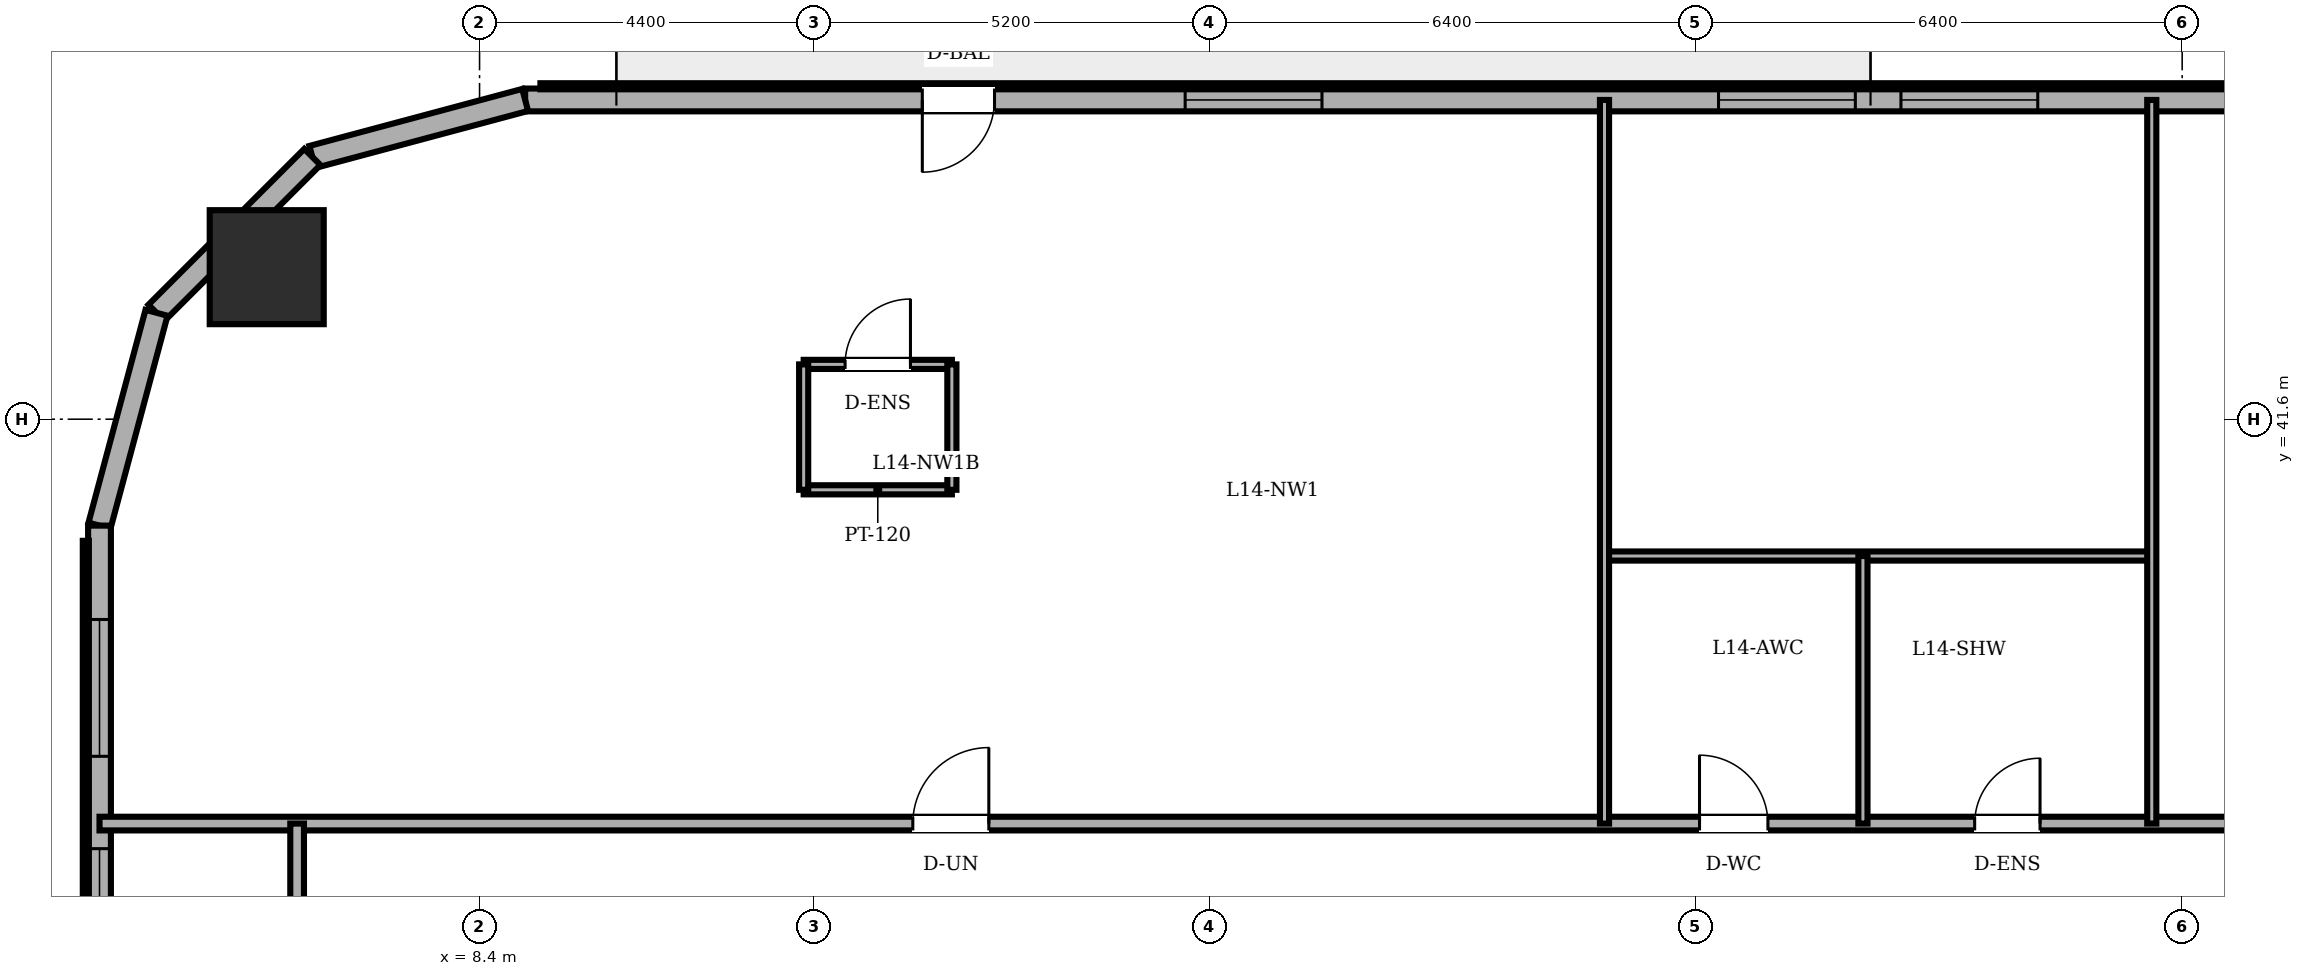
"""IFC4 building model, lengths in metres.
Left out: names, types, materials, properties, quantities, classifications, styles, units other than length and angle.
Written with IfcOpenShell. Run it as: python <this file> out.ifc"""

import sys

from ifc_helpers import new_model, si_unit, direction, frame, frame_2d, origin, origin_2d, place, context, subcontext, project, spatial, rectangle, circle, extrude, element, fill, save


model = new_model("IFC4")
c1 = context("Model", 3, precision=1e-05, world=origin(), true_north=direction((0.0, 1.0)))
c2 = subcontext(c1, "Body", "Model", "MODEL_VIEW")
j1 = project(units=[si_unit("LENGTHUNIT", "METRE"), si_unit("PLANEANGLEUNIT", "RADIAN")], contexts=[c1])
p1 = place(None, origin())
s1 = spatial("IfcSite", under=j1, at=p1, CompositionType="ELEMENT")
p2 = place(p1, origin())
s2 = spatial("IfcBuilding", under=s1, at=p2, CompositionType="ELEMENT")
p3 = place(p2, frame((0.0, 0.0, 54.0)))
s3 = spatial("IfcBuildingStorey", under=s2, at=p3, CompositionType="ELEMENT", Elevation=54.0)
p4 = place(p3, frame((5.6, 43.6, 0.0), z_axis=(0.0, 0.0, 1.0), x_axis=(1.0, 0.0, 0.0)))
e1 = element("IfcColumn", 1, at=p4, inside=s3, PredefinedType="COLUMN", context=c2, shape_type="SweptSolid", body=[
    extrude(circle(Radius=0.75, at=origin_2d()), origin(), (0.0, 0.0, 1.0), 3.6),
])
p5 = place(p3, frame((39.079, 45.8, 0.0), z_axis=(0.0, 0.0, 1.0), x_axis=(-1.0, 0.0, 0.0)))
e2 = element("IfcWall", 2, at=p5, inside=s3, PredefinedType="SOLIDWALL", context=c2, shape_type="SweptSolid", body=[
    extrude(rectangle(XDim=30.079, YDim=0.3, at=frame_2d((15.04, 0.0))), origin(), (0.0, 0.0, 1.0), 3.4),
])
p6 = place(p5, frame((23.904, 0.0, 0.0)))
e3 = element("IfcOpeningElement", 3, at=p6, cuts=e2, PredefinedType="OPENING", context=c2, shape_type="SweptSolid", body=[
    extrude(rectangle(XDim=0.95, YDim=2.2, at=frame_2d((0.475, 1.1))), frame((0.0, 0.16, 0.0), z_axis=(0.0, -1.0, 0.0), x_axis=(1.0, 0.0, 0.0)), (0.0, 0.0, 1.0), 0.32),
])
p7 = place(p5, frame((2.226, 0.0, 0.85)))
e4 = element("IfcOpeningElement", 4, at=p7, cuts=e2, PredefinedType="OPENING", context=c2, shape_type="SweptSolid", body=[
    extrude(rectangle(XDim=1.8, YDim=1.55, at=frame_2d((0.9, 0.775))), frame((0.0, 0.16, 0.0), z_axis=(0.0, -1.0, 0.0), x_axis=(1.0, 0.0, 0.0)), (0.0, 0.0, 1.0), 0.32),
])
p8 = place(p5, frame((5.003, 0.0, 0.85)))
e5 = element("IfcOpeningElement", 5, at=p8, cuts=e2, PredefinedType="OPENING", context=c2, shape_type="SweptSolid", body=[
    extrude(rectangle(XDim=1.8, YDim=1.55, at=frame_2d((0.9, 0.775))), frame((0.0, 0.16, 0.0), z_axis=(0.0, -1.0, 0.0), x_axis=(1.0, 0.0, 0.0)), (0.0, 0.0, 1.0), 0.32),
])
p9 = place(p5, frame((10.179, 0.0, 0.85)))
e6 = element("IfcOpeningElement", 6, at=p9, cuts=e2, PredefinedType="OPENING", context=c2, shape_type="SweptSolid", body=[
    extrude(rectangle(XDim=1.8, YDim=1.55, at=frame_2d((0.9, 0.775))), frame((0.0, 0.16, 0.0), z_axis=(0.0, -1.0, 0.0), x_axis=(1.0, 0.0, 0.0)), (0.0, 0.0, 1.0), 0.32),
])
p10 = place(p5, frame((12.579, 0.0, 0.85)))
e7 = element("IfcOpeningElement", 7, at=p10, cuts=e2, PredefinedType="OPENING", context=c2, shape_type="SweptSolid", body=[
    extrude(rectangle(XDim=1.8, YDim=1.55, at=frame_2d((0.9, 0.775))), frame((0.0, 0.16, 0.0), z_axis=(0.0, -1.0, 0.0), x_axis=(1.0, 0.0, 0.0)), (0.0, 0.0, 1.0), 0.32),
])
p11 = place(p5, frame((19.596, 0.0, 0.85)))
e8 = element("IfcOpeningElement", 8, at=p11, cuts=e2, PredefinedType="OPENING", context=c2, shape_type="SweptSolid", body=[
    extrude(rectangle(XDim=1.8, YDim=1.55, at=frame_2d((0.9, 0.775))), frame((0.0, 0.16, 0.0), z_axis=(0.0, -1.0, 0.0), x_axis=(1.0, 0.0, 0.0)), (0.0, 0.0, 1.0), 0.32),
])
p12 = place(p3, frame((9.0, 45.8, 0.0), z_axis=(0.0, 0.0, 1.0), x_axis=(-0.96594917914, -0.258731875344, 0.0)))
e9 = element("IfcWall", 9, at=p12, inside=s3, PredefinedType="SOLIDWALL", context=c2, shape_type="SweptSolid", body=[
    extrude(rectangle(XDim=2.899, YDim=0.3, at=frame_2d((1.449, 0.0))), origin(), (0.0, 0.0, 1.0), 3.4),
])
p13 = place(p3, frame((6.2, 45.05, 0.0), z_axis=(0.0, 0.0, 1.0), x_axis=(-0.707106781187, -0.707106781187, 0.0)))
e10 = element("IfcWall", 10, at=p13, inside=s3, PredefinedType="SOLIDWALL", context=c2, shape_type="SweptSolid", body=[
    extrude(rectangle(XDim=2.899, YDim=0.3, at=frame_2d((1.45, 0.0))), origin(), (0.0, 0.0, 1.0), 3.4),
])
p14 = place(p3, frame((4.15, 43.0, 0.0), z_axis=(0.0, 0.0, 1.0), x_axis=(-0.258731875344, -0.96594917914, 0.0)))
e11 = element("IfcWall", 11, at=p14, inside=s3, PredefinedType="SOLIDWALL", context=c2, shape_type="SweptSolid", body=[
    extrude(rectangle(XDim=2.899, YDim=0.3, at=frame_2d((1.449, 0.0))), origin(), (0.0, 0.0, 1.0), 3.4),
])
p15 = place(p3, frame((3.4, 40.2, 0.0), z_axis=(0.0, 0.0, 1.0), x_axis=(0.0, -1.0, 0.0)))
e12 = element("IfcWall", 12, at=p15, inside=s3, PredefinedType="SOLIDWALL", context=c2, shape_type="SweptSolid", body=[
    extrude(rectangle(XDim=32.4, YDim=0.3, at=frame_2d((16.2, 0.0))), origin(), (0.0, 0.0, 1.0), 3.4),
])
p16 = place(p15, frame((1.235, 0.0, 0.85)))
e13 = element("IfcOpeningElement", 13, at=p16, cuts=e12, PredefinedType="OPENING", context=c2, shape_type="SweptSolid", body=[
    extrude(rectangle(XDim=1.8, YDim=1.55, at=frame_2d((0.9, 0.775))), frame((0.0, 0.16, 0.0), z_axis=(0.0, -1.0, 0.0), x_axis=(1.0, 0.0, 0.0)), (0.0, 0.0, 1.0), 0.32),
])
p17 = place(p15, frame((4.25, 0.0, 0.85)))
e14 = element("IfcOpeningElement", 14, at=p17, cuts=e12, PredefinedType="OPENING", context=c2, shape_type="SweptSolid", body=[
    extrude(rectangle(XDim=1.8, YDim=1.55, at=frame_2d((0.9, 0.775))), frame((0.0, 0.16, 0.0), z_axis=(0.0, -1.0, 0.0), x_axis=(1.0, 0.0, 0.0)), (0.0, 0.0, 1.0), 0.32),
])
p18 = place(p15, frame((9.253, 0.0, 0.85)))
e15 = element("IfcOpeningElement", 15, at=p18, cuts=e12, PredefinedType="OPENING", context=c2, shape_type="SweptSolid", body=[
    extrude(rectangle(XDim=1.8, YDim=1.55, at=frame_2d((0.9, 0.775))), frame((0.0, 0.16, 0.0), z_axis=(0.0, -1.0, 0.0), x_axis=(1.0, 0.0, 0.0)), (0.0, 0.0, 1.0), 0.32),
])
p19 = place(p15, frame((13.027, 0.0, 0.85)))
e16 = element("IfcOpeningElement", 16, at=p19, cuts=e12, PredefinedType="OPENING", context=c2, shape_type="SweptSolid", body=[
    extrude(rectangle(XDim=1.8, YDim=1.55, at=frame_2d((0.9, 0.775))), frame((0.0, 0.16, 0.0), z_axis=(0.0, -1.0, 0.0), x_axis=(1.0, 0.0, 0.0)), (0.0, 0.0, 1.0), 0.32),
])
p20 = place(p15, frame((19.573, 0.0, 0.85)))
e17 = element("IfcOpeningElement", 17, at=p20, cuts=e12, PredefinedType="OPENING", context=c2, shape_type="SweptSolid", body=[
    extrude(rectangle(XDim=1.8, YDim=1.55, at=frame_2d((0.9, 0.775))), frame((0.0, 0.16, 0.0), z_axis=(0.0, -1.0, 0.0), x_axis=(1.0, 0.0, 0.0)), (0.0, 0.0, 1.0), 0.32),
])
p21 = place(p15, frame((22.347, 0.0, 0.85)))
e18 = element("IfcOpeningElement", 18, at=p21, cuts=e12, PredefinedType="OPENING", context=c2, shape_type="SweptSolid", body=[
    extrude(rectangle(XDim=1.8, YDim=1.55, at=frame_2d((0.9, 0.775))), frame((0.0, 0.16, 0.0), z_axis=(0.0, -1.0, 0.0), x_axis=(1.0, 0.0, 0.0)), (0.0, 0.0, 1.0), 0.32),
])
p22 = place(p15, frame((26.35, 0.0, 0.85)))
e19 = element("IfcOpeningElement", 19, at=p22, cuts=e12, PredefinedType="OPENING", context=c2, shape_type="SweptSolid", body=[
    extrude(rectangle(XDim=1.8, YDim=1.55, at=frame_2d((0.9, 0.775))), frame((0.0, 0.16, 0.0), z_axis=(0.0, -1.0, 0.0), x_axis=(1.0, 0.0, 0.0)), (0.0, 0.0, 1.0), 0.32),
])
p23 = place(p15, frame((29.365, 0.0, 0.85)))
e20 = element("IfcOpeningElement", 20, at=p23, cuts=e12, PredefinedType="OPENING", context=c2, shape_type="SweptSolid", body=[
    extrude(rectangle(XDim=1.8, YDim=1.55, at=frame_2d((0.9, 0.775))), frame((0.0, 0.16, 0.0), z_axis=(0.0, -1.0, 0.0), x_axis=(1.0, 0.0, 0.0)), (0.0, 0.0, 1.0), 0.32),
])
p24 = place(p3, frame((12.664, 42.321, 0.0), z_axis=(0.0, 0.0, 1.0), x_axis=(1.0, 0.0, 0.0)))
e21 = element("IfcWall", 21, at=p24, inside=s3, PredefinedType="PARTITIONING", context=c2, shape_type="SweptSolid", body=[
    extrude(rectangle(XDim=1.95, YDim=0.12, at=frame_2d((0.975, 0.0))), origin(), (0.0, 0.0, 1.0), 3.4),
])
p25 = place(p24, frame((0.545, 0.0, 0.0)))
e22 = element("IfcOpeningElement", 22, at=p25, cuts=e21, PredefinedType="OPENING", context=c2, shape_type="SweptSolid", body=[
    extrude(rectangle(XDim=0.86, YDim=2.1, at=frame_2d((0.43, 1.05))), frame((0.0, 0.07, 0.0), z_axis=(0.0, -1.0, 0.0), x_axis=(1.0, 0.0, 0.0)), (0.0, 0.0, 1.0), 0.14),
])
p26 = place(p3, frame((14.614, 40.671, 0.0), z_axis=(0.0, 0.0, 1.0), x_axis=(-1.0, 0.0, 0.0)))
e23 = element("IfcWall", 23, at=p26, inside=s3, PredefinedType="PARTITIONING", context=c2, shape_type="SweptSolid", body=[
    extrude(rectangle(XDim=1.95, YDim=0.12, at=frame_2d((0.975, 0.0))), origin(), (0.0, 0.0, 1.0), 3.4),
])
for number, where, z_axis, x_axis in (
    (24, (12.664, 42.321, 0.0), (0.0, 0.0, 1.0), (0.0, -1.0, 0.0)),
    (25, (14.614, 40.671, 0.0), (0.0, 0.0, 1.0), (0.0, 1.0, 0.0)),
):
    element("IfcWall", number, at=place(p3, frame(where, z_axis=z_axis, x_axis=x_axis)), inside=s3, PredefinedType="PARTITIONING", context=c2, shape_type="SweptSolid", body=[
        extrude(rectangle(XDim=1.65, YDim=0.12, at=frame_2d((0.825, 0.0))), origin(), (0.0, 0.0, 1.0), 3.4),
    ])
p27 = place(p3, frame((3.4, 36.28, 0.0), z_axis=(0.0, 0.0, 1.0), x_axis=(1.0, 0.0, 0.0)))
e26 = element("IfcWall", 26, at=p27, inside=s3, PredefinedType="PARTITIONING", context=c2, shape_type="SweptSolid", body=[
    extrude(rectangle(XDim=36.45, YDim=0.18, at=frame_2d((18.225, 0.0))), origin(), (0.0, 0.0, 1.0), 3.4),
])
p28 = place(p27, frame((21.05, 0.0, 0.0)))
e27 = element("IfcOpeningElement", 27, at=p28, cuts=e26, PredefinedType="OPENING", context=c2, shape_type="SweptSolid", body=[
    extrude(rectangle(XDim=0.9, YDim=2.1, at=frame_2d((0.45, 1.05))), frame((0.0, 0.1, 0.0), z_axis=(0.0, -1.0, 0.0), x_axis=(1.0, 0.0, 0.0)), (0.0, 0.0, 1.0), 0.2),
])
p29 = place(p27, frame((24.67, 0.0, 0.0)))
e28 = element("IfcOpeningElement", 28, at=p29, cuts=e26, PredefinedType="OPENING", context=c2, shape_type="SweptSolid", body=[
    extrude(rectangle(XDim=0.86, YDim=2.1, at=frame_2d((0.43, 1.05))), frame((0.0, 0.1, 0.0), z_axis=(0.0, -1.0, 0.0), x_axis=(1.0, 0.0, 0.0)), (0.0, 0.0, 1.0), 0.2),
])
p30 = place(p27, frame((10.7, 0.0, 0.0)))
e29 = element("IfcOpeningElement", 29, at=p30, cuts=e26, PredefinedType="OPENING", context=c2, shape_type="SweptSolid", body=[
    extrude(rectangle(XDim=1.0, YDim=2.15, at=frame_2d((0.5, 1.075))), frame((0.0, 0.1, 0.0), z_axis=(0.0, -1.0, 0.0), x_axis=(1.0, 0.0, 0.0)), (0.0, 0.0, 1.0), 0.2),
])
p31 = place(p27, frame((30.965, 0.0, 0.0)))
e30 = element("IfcOpeningElement", 30, at=p31, cuts=e26, PredefinedType="OPENING", context=c2, shape_type="SweptSolid", body=[
    extrude(rectangle(XDim=1.0, YDim=2.15, at=frame_2d((0.5, 1.075))), frame((0.0, 0.1, 0.0), z_axis=(0.0, -1.0, 0.0), x_axis=(1.0, 0.0, 0.0)), (0.0, 0.0, 1.0), 0.2),
])
p32 = place(p3, frame((23.2, 39.8, 0.0), z_axis=(0.0, 0.0, 1.0), x_axis=(1.0, 0.0, 0.0)))
e31 = element("IfcWall", 31, at=p32, inside=s3, PredefinedType="PARTITIONING", context=c2, shape_type="SweptSolid", body=[
    extrude(rectangle(XDim=7.2, YDim=0.12, at=frame_2d((3.6, 0.0))), origin(), (0.0, 0.0, 1.0), 3.4),
])
p33 = place(p3, frame((6.0, 33.82, 0.0), z_axis=(0.0, 0.0, 1.0), x_axis=(0.0, 1.0, 0.0)))
e32 = element("IfcWall", 32, at=p33, inside=s3, PredefinedType="PARTITIONING", context=c2, shape_type="SweptSolid", body=[
    extrude(rectangle(XDim=2.46, YDim=0.18, at=frame_2d((1.23, 0.0))), origin(), (0.0, 0.0, 1.0), 3.4),
])
p34 = place(p3, frame((23.2, 36.28, 0.0), z_axis=(0.0, 0.0, 1.0), x_axis=(0.0, 1.0, 0.0)))
e33 = element("IfcWall", 33, at=p34, inside=s3, PredefinedType="PARTITIONING", context=c2, shape_type="SweptSolid", body=[
    extrude(rectangle(XDim=9.52, YDim=0.12, at=frame_2d((4.76, 0.0))), origin(), (0.0, 0.0, 1.0), 3.4),
])
p35 = place(p3, frame((26.6, 36.28, 0.0), z_axis=(0.0, 0.0, 1.0), x_axis=(0.0, 1.0, 0.0)))
e34 = element("IfcWall", 34, at=p35, inside=s3, PredefinedType="PARTITIONING", context=c2, shape_type="SweptSolid", body=[
    extrude(rectangle(XDim=3.52, YDim=0.12, at=frame_2d((1.76, 0.0))), origin(), (0.0, 0.0, 1.0), 3.4),
])
p36 = place(p3, frame((30.4, 36.28, 0.0), z_axis=(0.0, 0.0, 1.0), x_axis=(0.0, 1.0, 0.0)))
e35 = element("IfcWall", 35, at=p36, inside=s3, PredefinedType="PARTITIONING", context=c2, shape_type="SweptSolid", body=[
    extrude(rectangle(XDim=9.52, YDim=0.12, at=frame_2d((4.76, 0.0))), origin(), (0.0, 0.0, 1.0), 3.4),
])
p37 = place(p6, origin())
e36 = element("IfcDoor", 36, at=p37, inside=s3, OperationType="SINGLE_SWING_RIGHT", PredefinedType="DOOR", context=c2, shape_type="SweptSolid", body=[
    extrude(rectangle(XDim=0.95, YDim=2.2, at=frame_2d((0.475, 1.1))), frame((0.0, 0.025, 0.0), z_axis=(0.0, -1.0, 0.0), x_axis=(1.0, 0.0, 0.0)), (0.0, 0.0, 1.0), 0.05),
])
fill(e3, e36)
p38 = place(p9, origin())
e37 = element("IfcWindow", 37, at=p38, inside=s3, PartitioningType="DOUBLE_PANEL_VERTICAL", PredefinedType="WINDOW", context=c2, shape_type="SweptSolid", body=[
    extrude(rectangle(XDim=1.8, YDim=1.55, at=frame_2d((0.9, 0.775))), frame((0.0, 0.03, 0.0), z_axis=(0.0, -1.0, 0.0), x_axis=(1.0, 0.0, 0.0)), (0.0, 0.0, 1.0), 0.06),
])
fill(e6, e37)
p39 = place(p10, origin())
e38 = element("IfcWindow", 38, at=p39, inside=s3, PartitioningType="DOUBLE_PANEL_VERTICAL", PredefinedType="WINDOW", context=c2, shape_type="SweptSolid", body=[
    extrude(rectangle(XDim=1.8, YDim=1.55, at=frame_2d((0.9, 0.775))), frame((0.0, 0.03, 0.0), z_axis=(0.0, -1.0, 0.0), x_axis=(1.0, 0.0, 0.0)), (0.0, 0.0, 1.0), 0.06),
])
fill(e7, e38)
p40 = place(p11, origin())
e39 = element("IfcWindow", 39, at=p40, inside=s3, PartitioningType="DOUBLE_PANEL_VERTICAL", PredefinedType="WINDOW", context=c2, shape_type="SweptSolid", body=[
    extrude(rectangle(XDim=1.8, YDim=1.55, at=frame_2d((0.9, 0.775))), frame((0.0, 0.03, 0.0), z_axis=(0.0, -1.0, 0.0), x_axis=(1.0, 0.0, 0.0)), (0.0, 0.0, 1.0), 0.06),
])
fill(e8, e39)
p41 = place(p16, origin())
e40 = element("IfcWindow", 40, at=p41, inside=s3, PartitioningType="DOUBLE_PANEL_VERTICAL", PredefinedType="WINDOW", context=c2, shape_type="SweptSolid", body=[
    extrude(rectangle(XDim=1.8, YDim=1.55, at=frame_2d((0.9, 0.775))), frame((0.0, 0.03, 0.0), z_axis=(0.0, -1.0, 0.0), x_axis=(1.0, 0.0, 0.0)), (0.0, 0.0, 1.0), 0.06),
])
fill(e13, e40)
p42 = place(p17, origin())
e41 = element("IfcWindow", 41, at=p42, inside=s3, PartitioningType="DOUBLE_PANEL_VERTICAL", PredefinedType="WINDOW", context=c2, shape_type="SweptSolid", body=[
    extrude(rectangle(XDim=1.8, YDim=1.55, at=frame_2d((0.9, 0.775))), frame((0.0, 0.03, 0.0), z_axis=(0.0, -1.0, 0.0), x_axis=(1.0, 0.0, 0.0)), (0.0, 0.0, 1.0), 0.06),
])
fill(e14, e41)
p43 = place(p25, origin())
e42 = element("IfcDoor", 42, at=p43, inside=s3, OperationType="SINGLE_SWING_RIGHT", PredefinedType="DOOR", context=c2, shape_type="SweptSolid", body=[
    extrude(rectangle(XDim=0.86, YDim=2.1, at=frame_2d((0.43, 1.05))), frame((0.0, 0.025, 0.0), z_axis=(0.0, -1.0, 0.0), x_axis=(1.0, 0.0, 0.0)), (0.0, 0.0, 1.0), 0.05),
])
fill(e22, e42)
p44 = place(p28, origin())
e43 = element("IfcDoor", 43, at=p44, inside=s3, OperationType="SINGLE_SWING_LEFT", PredefinedType="DOOR", context=c2, shape_type="SweptSolid", body=[
    extrude(rectangle(XDim=0.9, YDim=2.1, at=frame_2d((0.45, 1.05))), frame((0.0, 0.025, 0.0), z_axis=(0.0, -1.0, 0.0), x_axis=(1.0, 0.0, 0.0)), (0.0, 0.0, 1.0), 0.05),
])
fill(e27, e43)
p45 = place(p29, origin())
e44 = element("IfcDoor", 44, at=p45, inside=s3, OperationType="SINGLE_SWING_RIGHT", PredefinedType="DOOR", context=c2, shape_type="SweptSolid", body=[
    extrude(rectangle(XDim=0.86, YDim=2.1, at=frame_2d((0.43, 1.05))), frame((0.0, 0.025, 0.0), z_axis=(0.0, -1.0, 0.0), x_axis=(1.0, 0.0, 0.0)), (0.0, 0.0, 1.0), 0.05),
])
fill(e28, e44)
p46 = place(p30, origin())
e45 = element("IfcDoor", 45, at=p46, inside=s3, OperationType="SINGLE_SWING_RIGHT", PredefinedType="DOOR", context=c2, shape_type="SweptSolid", body=[
    extrude(rectangle(XDim=1.0, YDim=2.15, at=frame_2d((0.5, 1.075))), frame((0.0, 0.025, 0.0), z_axis=(0.0, -1.0, 0.0), x_axis=(1.0, 0.0, 0.0)), (0.0, 0.0, 1.0), 0.05),
])
fill(e29, e45)
save(model, sys.argv[1])
